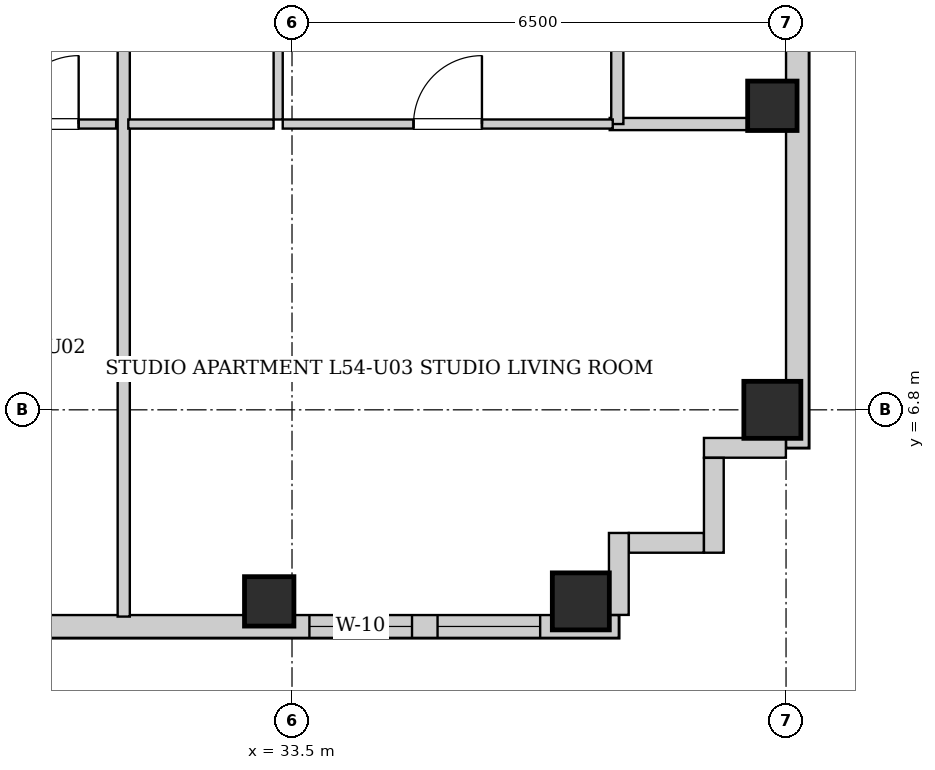
"""IFC4 building model, lengths in metres.
Left out: names, types, materials, properties, quantities, classifications, styles, units other than length and angle.
Written with IfcOpenShell. Run it as: python <this file> out.ifc"""

import sys

from ifc_helpers import new_model, si_unit, direction, frame, frame_2d, origin, origin_2d, place, context, subcontext, project, spatial, rectangle, extrude, element, fill, save


model = new_model("IFC4")
c1 = context("Model", 3, precision=1e-05, world=origin(), true_north=direction((0.0, 1.0)))
c2 = subcontext(c1, "Body", "Model", "MODEL_VIEW")
j1 = project(units=[si_unit("LENGTHUNIT", "METRE"), si_unit("PLANEANGLEUNIT", "RADIAN")], contexts=[c1])
p1 = place(None, origin())
s1 = spatial("IfcSite", under=j1, at=p1, CompositionType="ELEMENT")
p2 = place(p1, origin())
s2 = spatial("IfcBuilding", under=s1, at=p2, CompositionType="ELEMENT")
p3 = place(p2, frame((0.0, 0.0, 187.6)))
s3 = spatial("IfcBuildingStorey", under=s2, at=p3, CompositionType="ELEMENT", Elevation=187.6)
p4 = place(p3, frame((33.2, 4.28, 0.0), z_axis=(0.0, 0.0, 1.0), x_axis=(1.0, 0.0, 0.0)))
e1 = element("IfcColumn", 1, at=p4, inside=s3, PredefinedType="COLUMN", context=c2, shape_type="SweptSolid", body=[
    extrude(rectangle(XDim=0.65, YDim=0.65, at=origin_2d()), origin(), (0.0, 0.0, 1.0), 3.3),
])
for number, where, z_axis, x_axis in (
    (2, (37.3, 4.28, 0.0), (0.0, 0.0, 1.0), (1.0, 0.0, 0.0)),
    (3, (39.82, 6.8, 0.0), (0.0, 0.0, 1.0), (1.0, 0.0, 0.0)),
):
    element("IfcColumn", number, at=place(p3, frame(where, z_axis=z_axis, x_axis=x_axis)), inside=s3, PredefinedType="COLUMN", context=c2, shape_type="SweptSolid", body=[
        extrude(rectangle(XDim=0.75, YDim=0.75, at=origin_2d()), origin(), (0.0, 0.0, 1.0), 3.3),
    ])
p5 = place(p3, frame((39.82, 10.8, 0.0), z_axis=(0.0, 0.0, 1.0), x_axis=(1.0, 0.0, 0.0)))
e4 = element("IfcColumn", 4, at=p5, inside=s3, PredefinedType="COLUMN", context=c2, shape_type="SweptSolid", body=[
    extrude(rectangle(XDim=0.65, YDim=0.65, at=origin_2d()), origin(), (0.0, 0.0, 1.0), 3.3),
])
p6 = place(p3, frame((40.15, 37.7, 0.0), z_axis=(0.0, 0.0, 1.0), x_axis=(0.0, -1.0, 0.0)))
e5 = element("IfcWall", 5, at=p6, inside=s3, PredefinedType="SOLIDWALL", context=c2, shape_type="SweptSolid", body=[
    extrude(rectangle(XDim=31.4, YDim=0.3, at=frame_2d((15.7, 0.0))), origin(), (0.0, 0.0, 1.0), 3.04),
])
p7 = place(p6, frame((1.504, 0.0, 0.55)))
e6 = element("IfcOpeningElement", 6, at=p7, cuts=e5, PredefinedType="OPENING", context=c2, shape_type="SweptSolid", body=[
    extrude(rectangle(XDim=1.35, YDim=1.2, at=frame_2d((0.675, 0.6))), frame((0.0, 0.16, 0.0), z_axis=(0.0, -1.0, 0.0), x_axis=(1.0, 0.0, 0.0)), (0.0, 0.0, 1.0), 0.32),
])
p8 = place(p6, frame((18.2, 0.0, 0.55)))
e7 = element("IfcOpeningElement", 7, at=p8, cuts=e5, PredefinedType="OPENING", context=c2, shape_type="SweptSolid", body=[
    extrude(rectangle(XDim=1.35, YDim=1.2, at=frame_2d((0.675, 0.6))), frame((0.0, 0.16, 0.0), z_axis=(0.0, -1.0, 0.0), x_axis=(1.0, 0.0, 0.0)), (0.0, 0.0, 1.0), 0.32),
])
p9 = place(p6, frame((19.81, 0.0, 0.55)))
e8 = element("IfcOpeningElement", 8, at=p9, cuts=e5, PredefinedType="OPENING", context=c2, shape_type="SweptSolid", body=[
    extrude(rectangle(XDim=1.35, YDim=1.2, at=frame_2d((0.675, 0.6))), frame((0.0, 0.16, 0.0), z_axis=(0.0, -1.0, 0.0), x_axis=(1.0, 0.0, 0.0)), (0.0, 0.0, 1.0), 0.32),
])
p10 = place(p6, frame((11.043, 0.0, 0.55)))
e9 = element("IfcOpeningElement", 9, at=p10, cuts=e5, PredefinedType="OPENING", context=c2, shape_type="SweptSolid", body=[
    extrude(rectangle(XDim=1.35, YDim=1.2, at=frame_2d((0.675, 0.6))), frame((0.0, 0.16, 0.0), z_axis=(0.0, -1.0, 0.0), x_axis=(1.0, 0.0, 0.0)), (0.0, 0.0, 1.0), 0.32),
])
p11 = place(p6, frame((9.185, 0.0, 0.55)))
e10 = element("IfcOpeningElement", 10, at=p11, cuts=e5, PredefinedType="OPENING", context=c2, shape_type="SweptSolid", body=[
    extrude(rectangle(XDim=1.35, YDim=1.2, at=frame_2d((0.675, 0.6))), frame((0.0, 0.16, 0.0), z_axis=(0.0, -1.0, 0.0), x_axis=(1.0, 0.0, 0.0)), (0.0, 0.0, 1.0), 0.32),
])
p12 = place(p3, frame((37.8, 3.95, 0.0), z_axis=(0.0, 0.0, 1.0), x_axis=(-1.0, 0.0, 0.0)))
e11 = element("IfcWall", 11, at=p12, inside=s3, PredefinedType="SOLIDWALL", context=c2, shape_type="SweptSolid", body=[
    extrude(rectangle(XDim=16.3, YDim=0.3, at=frame_2d((8.15, 0.0))), origin(), (0.0, 0.0, 1.0), 3.04),
])
p13 = place(p12, frame((15.3, 0.0, 0.55)))
e12 = element("IfcOpeningElement", 12, at=p13, cuts=e11, PredefinedType="OPENING", context=c2, shape_type="SweptSolid", body=[
    extrude(rectangle(XDim=0.68, YDim=1.2, at=frame_2d((0.34, 0.6))), frame((0.0, 0.16, 0.0), z_axis=(0.0, -1.0, 0.0), x_axis=(1.0, 0.0, 0.0)), (0.0, 0.0, 1.0), 0.32),
])
p14 = place(p12, frame((8.154, 0.0, 0.55)))
e13 = element("IfcOpeningElement", 13, at=p14, cuts=e11, PredefinedType="OPENING", context=c2, shape_type="SweptSolid", body=[
    extrude(rectangle(XDim=1.35, YDim=1.2, at=frame_2d((0.675, 0.6))), frame((0.0, 0.16, 0.0), z_axis=(0.0, -1.0, 0.0), x_axis=(1.0, 0.0, 0.0)), (0.0, 0.0, 1.0), 0.32),
])
p15 = place(p12, frame((2.721, 0.0, 0.55)))
e14 = element("IfcOpeningElement", 14, at=p15, cuts=e11, PredefinedType="OPENING", context=c2, shape_type="SweptSolid", body=[
    extrude(rectangle(XDim=1.35, YDim=1.2, at=frame_2d((0.675, 0.6))), frame((0.0, 0.16, 0.0), z_axis=(0.0, -1.0, 0.0), x_axis=(1.0, 0.0, 0.0)), (0.0, 0.0, 1.0), 0.32),
])
p16 = place(p12, frame((1.035, 0.0, 0.55)))
e15 = element("IfcOpeningElement", 15, at=p16, cuts=e11, PredefinedType="OPENING", context=c2, shape_type="SweptSolid", body=[
    extrude(rectangle(XDim=1.35, YDim=1.2, at=frame_2d((0.675, 0.6))), frame((0.0, 0.16, 0.0), z_axis=(0.0, -1.0, 0.0), x_axis=(1.0, 0.0, 0.0)), (0.0, 0.0, 1.0), 0.32),
])
p17 = place(p3, frame((39.998, 6.3, 0.0), z_axis=(0.0, 0.0, 1.0), x_axis=(-1.0, 0.0, 0.0)))
e16 = element("IfcWall", 16, at=p17, inside=s3, PredefinedType="SOLIDWALL", context=c2, shape_type="SweptSolid", body=[
    extrude(rectangle(XDim=1.078, YDim=0.26, at=frame_2d((0.539, 0.0))), origin(), (0.0, 0.0, 1.0), 3.04),
])
p18 = place(p3, frame((39.05, 6.168, 0.0), z_axis=(0.0, 0.0, 1.0), x_axis=(0.0, -1.0, 0.0)))
e17 = element("IfcWall", 17, at=p18, inside=s3, PredefinedType="SOLIDWALL", context=c2, shape_type="SweptSolid", body=[
    extrude(rectangle(XDim=1.248, YDim=0.26, at=frame_2d((0.624, 0.0))), origin(), (0.0, 0.0, 1.0), 3.04),
])
p19 = place(p3, frame((38.918, 5.05, 0.0), z_axis=(0.0, 0.0, 1.0), x_axis=(-1.0, 0.0, 0.0)))
e18 = element("IfcWall", 18, at=p19, inside=s3, PredefinedType="SOLIDWALL", context=c2, shape_type="SweptSolid", body=[
    extrude(rectangle(XDim=0.986, YDim=0.26, at=frame_2d((0.493, 0.0))), origin(), (0.0, 0.0, 1.0), 3.04),
])
p20 = place(p3, frame((37.8, 5.18, 0.0), z_axis=(0.0, 0.0, 1.0), x_axis=(0.0, -1.0, 0.0)))
e19 = element("IfcWall", 19, at=p20, inside=s3, PredefinedType="SOLIDWALL", context=c2, shape_type="SweptSolid", body=[
    extrude(rectangle(XDim=1.078, YDim=0.26, at=frame_2d((0.539, 0.0))), origin(), (0.0, 0.0, 1.0), 3.04),
])
p21 = place(p3, frame((29.3, 10.56, 0.0), z_axis=(0.0, 0.0, 1.0), x_axis=(1.0, 0.0, 0.0)))
e20 = element("IfcWall", 20, at=p21, inside=s3, PredefinedType="PARTITIONING", context=c2, shape_type="SweptSolid", body=[
    extrude(rectangle(XDim=1.886, YDim=0.12, at=frame_2d((0.943, 0.0))), origin(), (0.0, 0.0, 1.0), 3.04),
])
p22 = place(p21, frame((0.493, 0.0, 0.0)))
e21 = element("IfcOpeningElement", 21, at=p22, cuts=e20, PredefinedType="OPENING", context=c2, shape_type="SweptSolid", body=[
    extrude(rectangle(XDim=0.9, YDim=2.05, at=frame_2d((0.45, 1.025))), frame((0.0, 0.07, 0.0), z_axis=(0.0, -1.0, 0.0), x_axis=(1.0, 0.0, 0.0)), (0.0, 0.0, 1.0), 0.14),
])
p23 = place(p3, frame((37.68, 10.56, 0.0), z_axis=(0.0, 0.0, 1.0), x_axis=(1.0, 0.0, 0.0)))
e22 = element("IfcWall", 22, at=p23, inside=s3, PredefinedType="PARTITIONING", context=c2, shape_type="SweptSolid", body=[
    extrude(rectangle(XDim=2.34, YDim=0.16, at=frame_2d((1.17, 0.0))), origin(), (0.0, 0.0, 1.0), 3.04),
])
p24 = place(p3, frame((37.78, 10.56, 0.0), z_axis=(0.0, 0.0, 1.0), x_axis=(0.0, 1.0, 0.0)))
e23 = element("IfcWall", 23, at=p24, inside=s3, PredefinedType="PARTITIONING", context=c2, shape_type="SweptSolid", body=[
    extrude(rectangle(XDim=2.91, YDim=0.16, at=frame_2d((1.455, 0.0))), origin(), (0.0, 0.0, 1.0), 3.04),
])
p25 = place(p3, frame((31.286, 4.08, 0.0), z_axis=(0.0, 0.0, 1.0), x_axis=(0.0, 1.0, 0.0)))
e24 = element("IfcWall", 24, at=p25, inside=s3, PredefinedType="PARTITIONING", context=c2, shape_type="SweptSolid", body=[
    extrude(rectangle(XDim=9.39, YDim=0.16, at=frame_2d((4.695, 0.0))), origin(), (0.0, 0.0, 1.0), 3.04),
])
p26 = place(p3, frame((33.318, 10.62, 0.0), z_axis=(0.0, 0.0, 1.0), x_axis=(0.0, 1.0, 0.0)))
e25 = element("IfcWall", 25, at=p26, inside=s3, PredefinedType="PARTITIONING", context=c2, shape_type="SweptSolid", body=[
    extrude(rectangle(XDim=2.85, YDim=0.12, at=frame_2d((1.425, 0.0))), origin(), (0.0, 0.0, 1.0), 3.04),
])
p27 = place(p26, frame((0.995, 0.0, 0.0)))
e26 = element("IfcOpeningElement", 26, at=p27, cuts=e25, PredefinedType="OPENING", context=c2, shape_type="SweptSolid", body=[
    extrude(rectangle(XDim=0.86, YDim=2.05, at=frame_2d((0.43, 1.025))), frame((0.0, 0.07, 0.0), z_axis=(0.0, -1.0, 0.0), x_axis=(1.0, 0.0, 0.0)), (0.0, 0.0, 1.0), 0.14),
])
p28 = place(p3, frame((31.346, 10.56, 0.0), z_axis=(0.0, 0.0, 1.0), x_axis=(1.0, 0.0, 0.0)))
e27 = element("IfcWall", 27, at=p28, inside=s3, PredefinedType="PARTITIONING", context=c2, shape_type="SweptSolid", body=[
    extrude(rectangle(XDim=1.912, YDim=0.12, at=frame_2d((0.956, 0.0))), origin(), (0.0, 0.0, 1.0), 3.04),
])
p29 = place(p3, frame((33.378, 10.56, 0.0), z_axis=(0.0, 0.0, 1.0), x_axis=(1.0, 0.0, 0.0)))
e28 = element("IfcWall", 28, at=p29, inside=s3, PredefinedType="PARTITIONING", context=c2, shape_type="SweptSolid", body=[
    extrude(rectangle(XDim=4.342, YDim=0.12, at=frame_2d((2.171, 0.0))), origin(), (0.0, 0.0, 1.0), 3.04),
])
p30 = place(p29, frame((1.721, 0.0, 0.0)))
e29 = element("IfcOpeningElement", 29, at=p30, cuts=e28, PredefinedType="OPENING", context=c2, shape_type="SweptSolid", body=[
    extrude(rectangle(XDim=0.9, YDim=2.05, at=frame_2d((0.45, 1.025))), frame((0.0, 0.07, 0.0), z_axis=(0.0, -1.0, 0.0), x_axis=(1.0, 0.0, 0.0)), (0.0, 0.0, 1.0), 0.14),
])
p31 = place(p22, origin())
e30 = element("IfcDoor", 30, at=p31, inside=s3, OperationType="SINGLE_SWING_RIGHT", PredefinedType="DOOR", context=c2, shape_type="SweptSolid", body=[
    extrude(rectangle(XDim=0.9, YDim=2.05, at=frame_2d((0.45, 1.025))), frame((0.0, 0.025, 0.0), z_axis=(0.0, -1.0, 0.0), x_axis=(1.0, 0.0, 0.0)), (0.0, 0.0, 1.0), 0.05),
])
fill(e21, e30)
p32 = place(p30, origin())
e31 = element("IfcDoor", 31, at=p32, inside=s3, OperationType="SINGLE_SWING_RIGHT", PredefinedType="DOOR", context=c2, shape_type="SweptSolid", body=[
    extrude(rectangle(XDim=0.9, YDim=2.05, at=frame_2d((0.45, 1.025))), frame((0.0, 0.025, 0.0), z_axis=(0.0, -1.0, 0.0), x_axis=(1.0, 0.0, 0.0)), (0.0, 0.0, 1.0), 0.05),
])
fill(e29, e31)
p33 = place(p15, origin())
e32 = element("IfcWindow", 32, at=p33, inside=s3, PartitioningType="SINGLE_PANEL", PredefinedType="WINDOW", context=c2, shape_type="SweptSolid", body=[
    extrude(rectangle(XDim=1.35, YDim=1.2, at=frame_2d((0.675, 0.6))), frame((0.0, 0.03, 0.0), z_axis=(0.0, -1.0, 0.0), x_axis=(1.0, 0.0, 0.0)), (0.0, 0.0, 1.0), 0.06),
])
fill(e14, e32)
p34 = place(p16, origin())
e33 = element("IfcWindow", 33, at=p34, inside=s3, PartitioningType="SINGLE_PANEL", PredefinedType="WINDOW", context=c2, shape_type="SweptSolid", body=[
    extrude(rectangle(XDim=1.35, YDim=1.2, at=frame_2d((0.675, 0.6))), frame((0.0, 0.03, 0.0), z_axis=(0.0, -1.0, 0.0), x_axis=(1.0, 0.0, 0.0)), (0.0, 0.0, 1.0), 0.06),
])
fill(e15, e33)
save(model, sys.argv[1])
